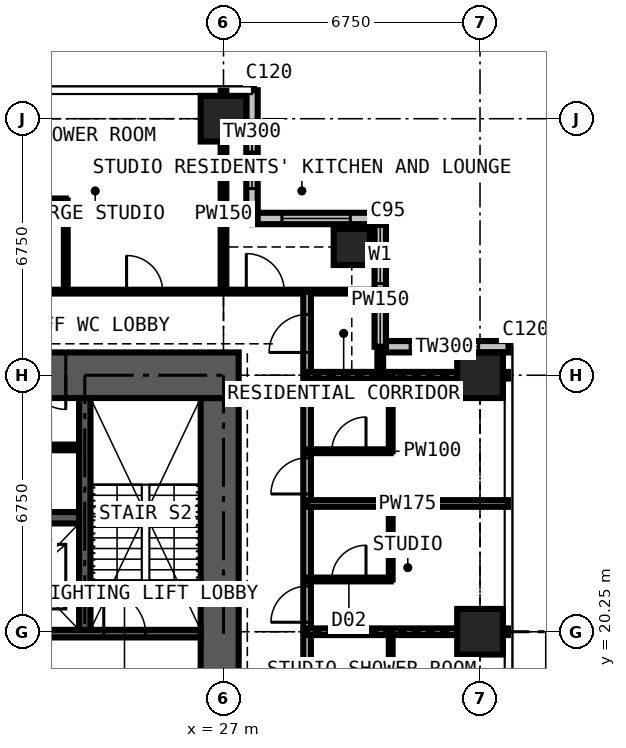
"""IFC4 building model, lengths in metres.
Left out: names, types, materials, properties, quantities, classifications, styles, units other than length and angle.
Written with IfcOpenShell. Run it as: python <this file> out.ifc"""

import sys

from ifc_helpers import new_model, si_unit, direction, frame, frame_2d, origin, origin_2d, place, context, subcontext, project, spatial, rectangle, extrude, element, fill, save


model = new_model("IFC4")
c1 = context("Model", 3, precision=1e-05, world=origin(), true_north=direction((0.0, 1.0)))
c2 = subcontext(c1, "Body", "Model", "MODEL_VIEW")
j1 = project(units=[si_unit("LENGTHUNIT", "METRE"), si_unit("PLANEANGLEUNIT", "RADIAN")], contexts=[c1])
p1 = place(None, origin())
s1 = spatial("IfcSite", under=j1, at=p1, CompositionType="ELEMENT")
p2 = place(p1, origin())
s2 = spatial("IfcBuilding", under=s1, at=p2, CompositionType="ELEMENT")
p3 = place(p2, frame((0.0, 0.0, 189.0)))
s3 = spatial("IfcBuildingStorey", under=s2, at=p3, CompositionType="ELEMENT", Elevation=189.0)
p4 = place(p3, frame((27.0, 33.75, 0.0), z_axis=(0.0, 0.0, 1.0), x_axis=(1.0, 0.0, 0.0)))
e1 = element("IfcColumn", 1, at=p4, inside=s3, PredefinedType="COLUMN", context=c2, shape_type="SweptSolid", body=[
    extrude(rectangle(XDim=1.2, YDim=1.2, at=origin_2d()), origin(), (0.0, 0.0, 1.0), 3.6),
])
p5 = place(p3, frame((30.375, 30.375, 0.0), z_axis=(0.0, 0.0, 1.0), x_axis=(1.0, 0.0, 0.0)))
e2 = element("IfcColumn", 2, at=p5, inside=s3, PredefinedType="COLUMN", context=c2, shape_type="SweptSolid", body=[
    extrude(rectangle(XDim=0.95, YDim=0.95, at=origin_2d()), origin(), (0.0, 0.0, 1.0), 3.6),
])
for number, where, z_axis, x_axis in (
    (3, (33.75, 20.25, 0.0), (0.0, 0.0, 1.0), (1.0, 0.0, 0.0)),
    (4, (33.75, 27.0, 0.0), (0.0, 0.0, 1.0), (1.0, 0.0, 0.0)),
):
    element("IfcColumn", number, at=place(p3, frame(where, z_axis=z_axis, x_axis=x_axis)), inside=s3, PredefinedType="COLUMN", context=c2, shape_type="SweptSolid", body=[
        extrude(rectangle(XDim=1.2, YDim=1.2, at=origin_2d()), origin(), (0.0, 0.0, 1.0), 3.6),
    ])
p6 = place(p3, frame((26.9, 14.1, 0.0), z_axis=(0.0, 0.0, 1.0), x_axis=(0.0, 1.0, 0.0)))
e5 = element("IfcWall", 5, at=p6, inside=s3, PredefinedType="SHEAR", context=c2, shape_type="SweptSolid", body=[
    extrude(rectangle(XDim=12.3, YDim=1.0, at=frame_2d((6.15, 0.0))), origin(), (0.0, 0.0, 1.0), 3.6),
])
p7 = place(p6, frame((3.65, 0.0, 0.0)))
e6 = element("IfcOpeningElement", 6, at=p7, cuts=e5, PredefinedType="OPENING", context=c2, shape_type="SweptSolid", body=[
    extrude(rectangle(XDim=1.2, YDim=2.2, at=frame_2d((0.6, 1.1))), frame((0.0, 0.51, 0.0), z_axis=(0.0, -1.0, 0.0), x_axis=(1.0, 0.0, 0.0)), (0.0, 0.0, 1.0), 1.02),
])
p8 = place(p3, frame((27.4, 27.0, 0.0), z_axis=(0.0, 0.0, 1.0), x_axis=(-1.0, 0.0, 0.0)))
e7 = element("IfcWall", 7, at=p8, inside=s3, PredefinedType="SHEAR", context=c2, shape_type="SweptSolid", body=[
    extrude(rectangle(XDim=14.3, YDim=1.2, at=frame_2d((7.15, 0.0))), origin(), (0.0, 0.0, 1.0), 3.6),
])
p9 = place(p8, frame((4.55, 0.0, 0.0)))
e8 = element("IfcOpeningElement", 8, at=p9, cuts=e7, PredefinedType="OPENING", context=c2, shape_type="SweptSolid", body=[
    extrude(rectangle(XDim=0.9, YDim=2.2, at=frame_2d((0.45, 1.1))), frame((0.0, 0.61, 0.0), z_axis=(0.0, -1.0, 0.0), x_axis=(1.0, 0.0, 0.0)), (0.0, 0.0, 1.0), 1.22),
])
p10 = place(p8, frame((7.525, 0.0, 0.0)))
e9 = element("IfcOpeningElement", 9, at=p10, cuts=e7, PredefinedType="OPENING", context=c2, shape_type="SweptSolid", body=[
    extrude(rectangle(XDim=1.0, YDim=2.2, at=frame_2d((0.5, 1.1))), frame((0.0, 0.61, 0.0), z_axis=(0.0, -1.0, 0.0), x_axis=(1.0, 0.0, 0.0)), (0.0, 0.0, 1.0), 1.22),
])
p11 = place(p3, frame((34.5, 27.75, 0.0), z_axis=(0.0, 0.0, 1.0), x_axis=(-1.0, 0.0, 0.0)))
e10 = element("IfcWall", 10, at=p11, inside=s3, PredefinedType="SOLIDWALL", context=c2, shape_type="SweptSolid", body=[
    extrude(rectangle(XDim=3.375, YDim=0.3, at=frame_2d((1.688, 0.0))), origin(), (0.0, 0.0, 1.0), 3.375),
])
p12 = place(p11, frame((0.788, 0.0, 0.6)))
e11 = element("IfcOpeningElement", 11, at=p12, cuts=e10, PredefinedType="OPENING", context=c2, shape_type="SweptSolid", body=[
    extrude(rectangle(XDim=1.8, YDim=2.1, at=frame_2d((0.9, 1.05))), frame((0.0, 0.16, 0.0), z_axis=(0.0, -1.0, 0.0), x_axis=(1.0, 0.0, 0.0)), (0.0, 0.0, 1.0), 0.32),
])
p13 = place(p3, frame((31.125, 27.75, 0.0), z_axis=(0.0, 0.0, 1.0), x_axis=(0.0, 1.0, 0.0)))
e12 = element("IfcWall", 12, at=p13, inside=s3, PredefinedType="SOLIDWALL", context=c2, shape_type="SweptSolid", body=[
    extrude(rectangle(XDim=3.375, YDim=0.3, at=frame_2d((1.688, 0.0))), origin(), (0.0, 0.0, 1.0), 3.375),
])
p14 = place(p13, frame((1.663, 0.0, 0.9)))
e13 = element("IfcOpeningElement", 13, at=p14, cuts=e12, PredefinedType="OPENING", context=c2, shape_type="SweptSolid", body=[
    extrude(rectangle(XDim=1.5, YDim=1.8, at=frame_2d((0.75, 0.9))), frame((0.0, 0.16, 0.0), z_axis=(0.0, -1.0, 0.0), x_axis=(1.0, 0.0, 0.0)), (0.0, 0.0, 1.0), 0.32),
])
p15 = place(p3, frame((31.125, 31.125, 0.0), z_axis=(0.0, 0.0, 1.0), x_axis=(-1.0, 0.0, 0.0)))
e14 = element("IfcWall", 14, at=p15, inside=s3, PredefinedType="SOLIDWALL", context=c2, shape_type="SweptSolid", body=[
    extrude(rectangle(XDim=3.375, YDim=0.3, at=frame_2d((1.688, 0.0))), origin(), (0.0, 0.0, 1.0), 3.375),
])
p16 = place(p15, frame((0.788, 0.0, 0.6)))
e15 = element("IfcOpeningElement", 15, at=p16, cuts=e14, PredefinedType="OPENING", context=c2, shape_type="SweptSolid", body=[
    extrude(rectangle(XDim=1.8, YDim=2.1, at=frame_2d((0.9, 1.05))), frame((0.0, 0.16, 0.0), z_axis=(0.0, -1.0, 0.0), x_axis=(1.0, 0.0, 0.0)), (0.0, 0.0, 1.0), 0.32),
])
p17 = place(p3, frame((27.75, 31.125, 0.0), z_axis=(0.0, 0.0, 1.0), x_axis=(0.0, 1.0, 0.0)))
e16 = element("IfcWall", 16, at=p17, inside=s3, PredefinedType="SOLIDWALL", context=c2, shape_type="SweptSolid", body=[
    extrude(rectangle(XDim=3.375, YDim=0.3, at=frame_2d((1.688, 0.0))), origin(), (0.0, 0.0, 1.0), 3.375),
])
p18 = place(p17, frame((0.788, 0.0, 0.6)))
e17 = element("IfcOpeningElement", 17, at=p18, cuts=e16, PredefinedType="OPENING", context=c2, shape_type="SweptSolid", body=[
    extrude(rectangle(XDim=1.8, YDim=2.1, at=frame_2d((0.9, 1.05))), frame((0.0, 0.16, 0.0), z_axis=(0.0, -1.0, 0.0), x_axis=(1.0, 0.0, 0.0)), (0.0, 0.0, 1.0), 0.32),
])
p19 = place(p3, frame((14.1, 20.2, 0.0), z_axis=(0.0, 0.0, 1.0), x_axis=(1.0, 0.0, 0.0)))
e18 = element("IfcWall", 18, at=p19, inside=s3, PredefinedType="SHEAR", context=c2, shape_type="SweptSolid", body=[
    extrude(rectangle(XDim=12.3, YDim=0.2, at=frame_2d((6.15, 0.0))), origin(), (0.0, 0.0, 1.0), 3.6),
])
p20 = place(p19, frame((4.56, 0.0, 0.0)))
e19 = element("IfcOpeningElement", 19, at=p20, cuts=e18, PredefinedType="OPENING", context=c2, shape_type="SweptSolid", body=[
    extrude(rectangle(XDim=1.1, YDim=2.2, at=frame_2d((0.55, 1.1))), frame((0.0, 0.11, 0.0), z_axis=(0.0, -1.0, 0.0), x_axis=(1.0, 0.0, 0.0)), (0.0, 0.0, 1.0), 0.22),
])
p21 = place(p19, frame((6.7, 0.0, 0.0)))
e20 = element("IfcOpeningElement", 20, at=p21, cuts=e18, PredefinedType="OPENING", context=c2, shape_type="SweptSolid", body=[
    extrude(rectangle(XDim=1.1, YDim=2.2, at=frame_2d((0.55, 1.1))), frame((0.0, 0.11, 0.0), z_axis=(0.0, -1.0, 0.0), x_axis=(1.0, 0.0, 0.0)), (0.0, 0.0, 1.0), 0.22),
])
p22 = place(p19, frame((0.35, 0.0, 0.0)))
e21 = element("IfcOpeningElement", 21, at=p22, cuts=e18, PredefinedType="OPENING", context=c2, shape_type="SweptSolid", body=[
    extrude(rectangle(XDim=1.1, YDim=2.2, at=frame_2d((0.55, 1.1))), frame((0.0, 0.11, 0.0), z_axis=(0.0, -1.0, 0.0), x_axis=(1.0, 0.0, 0.0)), (0.0, 0.0, 1.0), 0.22),
])
p23 = place(p19, frame((9.75, 0.0, 0.0)))
e22 = element("IfcOpeningElement", 22, at=p23, cuts=e18, PredefinedType="OPENING", context=c2, shape_type="SweptSolid", body=[
    extrude(rectangle(XDim=1.1, YDim=2.2, at=frame_2d((0.55, 1.1))), frame((0.0, 0.11, 0.0), z_axis=(0.0, -1.0, 0.0), x_axis=(1.0, 0.0, 0.0)), (0.0, 0.0, 1.0), 0.22),
])
p24 = place(p3, frame((23.35, 20.3, 0.0), z_axis=(0.0, 0.0, 1.0), x_axis=(0.0, 1.0, 0.0)))
e23 = element("IfcWall", 23, at=p24, inside=s3, PredefinedType="SHEAR", context=c2, shape_type="SweptSolid", body=[
    extrude(rectangle(XDim=6.1, YDim=0.3, at=frame_2d((3.05, 0.0))), origin(), (0.0, 0.0, 1.0), 3.6),
])
p25 = place(p3, frame((17.3, 23.25, 0.0), z_axis=(0.0, 0.0, 1.0), x_axis=(1.0, 0.0, 0.0)))
e24 = element("IfcWall", 24, at=p25, inside=s3, PredefinedType="SHEAR", context=c2, shape_type="SweptSolid", body=[
    extrude(rectangle(XDim=5.9, YDim=0.3, at=frame_2d((2.95, 0.0))), origin(), (0.0, 0.0, 1.0), 3.6),
])
p26 = place(p3, frame((20.8, 25.1, 0.0), z_axis=(0.0, 0.0, 1.0), x_axis=(1.0, 0.0, 0.0)))
e25 = element("IfcWall", 25, at=p26, inside=s3, PredefinedType="PARTITIONING", context=c2, shape_type="SweptSolid", body=[
    extrude(rectangle(XDim=2.4, YDim=0.15, at=frame_2d((1.2, 0.0))), origin(), (0.0, 0.0, 1.0), 3.375),
])
p27 = place(p26, frame((0.75, 0.0, 0.0)))
e26 = element("IfcOpeningElement", 26, at=p27, cuts=e25, PredefinedType="OPENING", context=c2, shape_type="SweptSolid", body=[
    extrude(rectangle(XDim=0.9, YDim=2.2, at=frame_2d((0.45, 1.1))), frame((0.0, 0.085, 0.0), z_axis=(0.0, -1.0, 0.0), x_axis=(1.0, 0.0, 0.0)), (0.0, 0.0, 1.0), 0.17),
])
p28 = place(p3, frame((11.3, 29.2, 0.0), z_axis=(0.0, 0.0, 1.0), x_axis=(1.0, 0.0, 0.0)))
e27 = element("IfcWall", 27, at=p28, inside=s3, PredefinedType="PARTITIONING", context=c2, shape_type="SweptSolid", body=[
    extrude(rectangle(XDim=19.809, YDim=0.1, at=frame_2d((9.904, 0.0))), origin(), (0.0, 0.0, 1.0), 3.375),
])
p29 = place(p28, frame((16.3, 0.0, 0.0)))
e28 = element("IfcOpeningElement", 28, at=p29, cuts=e27, PredefinedType="OPENING", context=c2, shape_type="SweptSolid", body=[
    extrude(rectangle(XDim=1.0, YDim=2.2, at=frame_2d((0.5, 1.1))), frame((0.0, 0.06, 0.0), z_axis=(0.0, -1.0, 0.0), x_axis=(1.0, 0.0, 0.0)), (0.0, 0.0, 1.0), 0.12),
])
p30 = place(p28, frame((6.4, 0.0, 0.0)))
e29 = element("IfcOpeningElement", 29, at=p30, cuts=e27, PredefinedType="OPENING", context=c2, shape_type="SweptSolid", body=[
    extrude(rectangle(XDim=0.95, YDim=2.2, at=frame_2d((0.475, 1.1))), frame((0.0, 0.06, 0.0), z_axis=(0.0, -1.0, 0.0), x_axis=(1.0, 0.0, 0.0)), (0.0, 0.0, 1.0), 0.12),
])
p31 = place(p28, frame((13.15, 0.0, 0.0)))
e30 = element("IfcOpeningElement", 30, at=p31, cuts=e27, PredefinedType="OPENING", context=c2, shape_type="SweptSolid", body=[
    extrude(rectangle(XDim=0.95, YDim=2.2, at=frame_2d((0.475, 1.1))), frame((0.0, 0.06, 0.0), z_axis=(0.0, -1.0, 0.0), x_axis=(1.0, 0.0, 0.0)), (0.0, 0.0, 1.0), 0.12),
])
p32 = place(p28, frame((0.6, 0.0, 0.0)))
e31 = element("IfcOpeningElement", 31, at=p32, cuts=e27, PredefinedType="OPENING", context=c2, shape_type="SweptSolid", body=[
    extrude(rectangle(XDim=1.0, YDim=2.2, at=frame_2d((0.5, 1.1))), frame((0.0, 0.06, 0.0), z_axis=(0.0, -1.0, 0.0), x_axis=(1.0, 0.0, 0.0)), (0.0, 0.0, 1.0), 0.12),
])
p33 = place(p3, frame((20.25, 31.6, 0.0), z_axis=(0.0, 0.0, 1.0), x_axis=(1.0, 0.0, 0.0)))
e32 = element("IfcWall", 32, at=p33, inside=s3, PredefinedType="PARTITIONING", context=c2, shape_type="SweptSolid", body=[
    extrude(rectangle(XDim=2.6, YDim=0.1, at=frame_2d((1.3, 0.0))), origin(), (0.0, 0.0, 1.0), 3.375),
])
p34 = place(p3, frame((22.85, 29.2, 0.0), z_axis=(0.0, 0.0, 1.0), x_axis=(0.0, 1.0, 0.0)))
e33 = element("IfcWall", 33, at=p34, inside=s3, PredefinedType="PARTITIONING", context=c2, shape_type="SweptSolid", body=[
    extrude(rectangle(XDim=2.4, YDim=0.1, at=frame_2d((1.2, 0.0))), origin(), (0.0, 0.0, 1.0), 3.375),
])
p35 = place(p3, frame((27.0, 29.2, 0.0), z_axis=(0.0, 0.0, 1.0), x_axis=(0.0, 1.0, 0.0)))
e34 = element("IfcWall", 34, at=p35, inside=s3, PredefinedType="PARTITIONING", context=c2, shape_type="SweptSolid", body=[
    extrude(rectangle(XDim=5.284, YDim=0.15, at=frame_2d((2.642, 0.0))), origin(), (0.0, 0.0, 1.0), 2.806),
])
p36 = place(p3, frame((29.2, 13.5, 0.0), z_axis=(0.0, 0.0, 1.0), x_axis=(0.0, 1.0, 0.0)))
e35 = element("IfcWall", 35, at=p36, inside=s3, PredefinedType="PARTITIONING", context=c2, shape_type="SweptSolid", body=[
    extrude(rectangle(XDim=15.7, YDim=0.2, at=frame_2d((7.85, 0.0))), origin(), (0.0, 0.0, 1.0), 3.375),
])
p37 = place(p36, frame((3.625, 0.0, 0.0)))
e36 = element("IfcOpeningElement", 36, at=p37, cuts=e35, PredefinedType="OPENING", context=c2, shape_type="SweptSolid", body=[
    extrude(rectangle(XDim=0.95, YDim=2.2, at=frame_2d((0.475, 1.1))), frame((0.0, 0.11, 0.0), z_axis=(0.0, -1.0, 0.0), x_axis=(1.0, 0.0, 0.0)), (0.0, 0.0, 1.0), 0.22),
])
p38 = place(p36, frame((7.0, 0.0, 0.0)))
e37 = element("IfcOpeningElement", 37, at=p38, cuts=e35, PredefinedType="OPENING", context=c2, shape_type="SweptSolid", body=[
    extrude(rectangle(XDim=0.95, YDim=2.2, at=frame_2d((0.475, 1.1))), frame((0.0, 0.11, 0.0), z_axis=(0.0, -1.0, 0.0), x_axis=(1.0, 0.0, 0.0)), (0.0, 0.0, 1.0), 0.22),
])
p39 = place(p36, frame((10.375, 0.0, 0.0)))
e38 = element("IfcOpeningElement", 38, at=p39, cuts=e35, PredefinedType="OPENING", context=c2, shape_type="SweptSolid", body=[
    extrude(rectangle(XDim=0.95, YDim=2.2, at=frame_2d((0.475, 1.1))), frame((0.0, 0.11, 0.0), z_axis=(0.0, -1.0, 0.0), x_axis=(1.0, 0.0, 0.0)), (0.0, 0.0, 1.0), 0.22),
])
p40 = place(p36, frame((14.1, 0.0, 0.0)))
e39 = element("IfcOpeningElement", 39, at=p40, cuts=e35, PredefinedType="OPENING", context=c2, shape_type="SweptSolid", body=[
    extrude(rectangle(XDim=1.0, YDim=2.2, at=frame_2d((0.5, 1.1))), frame((0.0, 0.11, 0.0), z_axis=(0.0, -1.0, 0.0), x_axis=(1.0, 0.0, 0.0)), (0.0, 0.0, 1.0), 0.22),
])
p41 = place(p3, frame((29.2, 20.25, 0.0), z_axis=(0.0, 0.0, 1.0), x_axis=(1.0, 0.0, 0.0)))
e40 = element("IfcWall", 40, at=p41, inside=s3, PredefinedType="PARTITIONING", context=c2, shape_type="SweptSolid", body=[
    extrude(rectangle(XDim=5.284, YDim=0.175, at=frame_2d((2.642, 0.0))), origin(), (0.0, 0.0, 1.0), 2.61),
])
p42 = place(p3, frame((29.2, 21.625, 0.0), z_axis=(0.0, 0.0, 1.0), x_axis=(1.0, 0.0, 0.0)))
e41 = element("IfcWall", 41, at=p42, inside=s3, PredefinedType="PARTITIONING", context=c2, shape_type="SweptSolid", body=[
    extrude(rectangle(XDim=2.2, YDim=0.1, at=frame_2d((1.1, 0.0))), origin(), (0.0, 0.0, 1.0), 3.375),
])
p43 = place(p42, frame((0.65, 0.0, 0.0)))
e42 = element("IfcOpeningElement", 42, at=p43, cuts=e41, PredefinedType="OPENING", context=c2, shape_type="SweptSolid", body=[
    extrude(rectangle(XDim=0.9, YDim=2.2, at=frame_2d((0.45, 1.1))), frame((0.0, 0.06, 0.0), z_axis=(0.0, -1.0, 0.0), x_axis=(1.0, 0.0, 0.0)), (0.0, 0.0, 1.0), 0.12),
])
p44 = place(p3, frame((29.2, 23.625, 0.0), z_axis=(0.0, 0.0, 1.0), x_axis=(1.0, 0.0, 0.0)))
e43 = element("IfcWall", 43, at=p44, inside=s3, PredefinedType="PARTITIONING", context=c2, shape_type="SweptSolid", body=[
    extrude(rectangle(XDim=5.284, YDim=0.175, at=frame_2d((2.642, 0.0))), origin(), (0.0, 0.0, 1.0), 3.375),
])
p45 = place(p3, frame((29.2, 25.0, 0.0), z_axis=(0.0, 0.0, 1.0), x_axis=(1.0, 0.0, 0.0)))
e44 = element("IfcWall", 44, at=p45, inside=s3, PredefinedType="PARTITIONING", context=c2, shape_type="SweptSolid", body=[
    extrude(rectangle(XDim=2.2, YDim=0.1, at=frame_2d((1.1, 0.0))), origin(), (0.0, 0.0, 1.0), 3.375),
])
p46 = place(p45, frame((0.65, 0.0, 0.0)))
e45 = element("IfcOpeningElement", 45, at=p46, cuts=e44, PredefinedType="OPENING", context=c2, shape_type="SweptSolid", body=[
    extrude(rectangle(XDim=0.9, YDim=2.2, at=frame_2d((0.45, 1.1))), frame((0.0, 0.06, 0.0), z_axis=(0.0, -1.0, 0.0), x_axis=(1.0, 0.0, 0.0)), (0.0, 0.0, 1.0), 0.12),
])
p47 = place(p3, frame((29.2, 27.0, 0.0), z_axis=(0.0, 0.0, 1.0), x_axis=(1.0, 0.0, 0.0)))
e46 = element("IfcWall", 46, at=p47, inside=s3, PredefinedType="PARTITIONING", context=c2, shape_type="SweptSolid", body=[
    extrude(rectangle(XDim=5.284, YDim=0.175, at=frame_2d((2.642, 0.0))), origin(), (0.0, 0.0, 1.0), 2.806),
])
p48 = place(p3, frame((31.125, 27.0, 0.0), z_axis=(0.0, 0.0, 1.0), x_axis=(0.0, 1.0, 0.0)))
e47 = element("IfcWall", 47, at=p48, inside=s3, PredefinedType="PARTITIONING", context=c2, shape_type="SweptSolid", body=[
    extrude(rectangle(XDim=0.734, YDim=0.15, at=frame_2d((0.367, 0.0))), origin(), (0.0, 0.0, 1.0), 3.375),
])
for number, where, z_axis, x_axis in (
    (48, (31.4, 18.25, 0.0), (0.0, 0.0, 1.0), (0.0, 1.0, 0.0)),
    (49, (31.4, 21.625, 0.0), (0.0, 0.0, 1.0), (0.0, 1.0, 0.0)),
    (50, (31.4, 25.0, 0.0), (0.0, 0.0, 1.0), (0.0, 1.0, 0.0)),
):
    element("IfcWall", number, at=place(p3, frame(where, z_axis=z_axis, x_axis=x_axis)), inside=s3, PredefinedType="PARTITIONING", context=c2, shape_type="SweptSolid", body=[
        extrude(rectangle(XDim=2.0, YDim=0.1, at=frame_2d((1.0, 0.0))), origin(), (0.0, 0.0, 1.0), 3.375),
    ])
p49 = place(p12, origin())
e51 = element("IfcWindow", 51, at=p49, inside=s3, PartitioningType="SINGLE_PANEL", PredefinedType="WINDOW", context=c2, shape_type="SweptSolid", body=[
    extrude(rectangle(XDim=1.8, YDim=2.1, at=frame_2d((0.9, 1.05))), frame((0.0, 0.03, 0.0), z_axis=(0.0, -1.0, 0.0), x_axis=(1.0, 0.0, 0.0)), (0.0, 0.0, 1.0), 0.06),
])
fill(e11, e51)
p50 = place(p14, origin())
e52 = element("IfcWindow", 52, at=p50, inside=s3, PartitioningType="SINGLE_PANEL", PredefinedType="WINDOW", context=c2, shape_type="SweptSolid", body=[
    extrude(rectangle(XDim=1.5, YDim=1.8, at=frame_2d((0.75, 0.9))), frame((0.0, 0.03, 0.0), z_axis=(0.0, -1.0, 0.0), x_axis=(1.0, 0.0, 0.0)), (0.0, 0.0, 1.0), 0.06),
])
fill(e13, e52)
p51 = place(p16, origin())
e53 = element("IfcWindow", 53, at=p51, inside=s3, PartitioningType="SINGLE_PANEL", PredefinedType="WINDOW", context=c2, shape_type="SweptSolid", body=[
    extrude(rectangle(XDim=1.8, YDim=2.1, at=frame_2d((0.9, 1.05))), frame((0.0, 0.03, 0.0), z_axis=(0.0, -1.0, 0.0), x_axis=(1.0, 0.0, 0.0)), (0.0, 0.0, 1.0), 0.06),
])
fill(e15, e53)
p52 = place(p18, origin())
e54 = element("IfcWindow", 54, at=p52, inside=s3, PartitioningType="SINGLE_PANEL", PredefinedType="WINDOW", context=c2, shape_type="SweptSolid", body=[
    extrude(rectangle(XDim=1.8, YDim=2.1, at=frame_2d((0.9, 1.05))), frame((0.0, 0.03, 0.0), z_axis=(0.0, -1.0, 0.0), x_axis=(1.0, 0.0, 0.0)), (0.0, 0.0, 1.0), 0.06),
])
fill(e17, e54)
p53 = place(p9, origin())
e55 = element("IfcDoor", 55, at=p53, inside=s3, OperationType="SINGLE_SWING_LEFT", PredefinedType="DOOR", context=c2, shape_type="SweptSolid", body=[
    extrude(rectangle(XDim=0.9, YDim=2.2, at=frame_2d((0.45, 1.1))), frame((0.0, 0.4, 0.0), z_axis=(0.0, -1.0, 0.0), x_axis=(1.0, 0.0, 0.0)), (0.0, 0.0, 1.0), 0.8),
])
fill(e8, e55)
p54 = place(p23, origin())
e56 = element("IfcDoor", 56, at=p54, inside=s3, OperationType="SINGLE_SWING_LEFT", PredefinedType="DOOR", context=c2, shape_type="SweptSolid", body=[
    extrude(rectangle(XDim=1.1, YDim=2.2, at=frame_2d((0.55, 1.1))), frame((0.0, 0.025, 0.0), z_axis=(0.0, -1.0, 0.0), x_axis=(1.0, 0.0, 0.0)), (0.0, 0.0, 1.0), 0.05),
])
fill(e22, e56)
p55 = place(p38, origin())
e57 = element("IfcDoor", 57, at=p55, inside=s3, OperationType="SINGLE_SWING_LEFT", PredefinedType="DOOR", context=c2, shape_type="SweptSolid", body=[
    extrude(rectangle(XDim=0.95, YDim=2.2, at=frame_2d((0.475, 1.1))), frame((0.0, 0.025, 0.0), z_axis=(0.0, -1.0, 0.0), x_axis=(1.0, 0.0, 0.0)), (0.0, 0.0, 1.0), 0.05),
])
fill(e37, e57)
p56 = place(p43, origin())
e58 = element("IfcDoor", 58, at=p56, inside=s3, OperationType="SINGLE_SWING_RIGHT", PredefinedType="DOOR", context=c2, shape_type="SweptSolid", body=[
    extrude(rectangle(XDim=0.9, YDim=2.2, at=frame_2d((0.45, 1.1))), frame((0.0, 0.025, 0.0), z_axis=(0.0, -1.0, 0.0), x_axis=(1.0, 0.0, 0.0)), (0.0, 0.0, 1.0), 0.05),
])
fill(e42, e58)
p57 = place(p39, origin())
e59 = element("IfcDoor", 59, at=p57, inside=s3, OperationType="SINGLE_SWING_LEFT", PredefinedType="DOOR", context=c2, shape_type="SweptSolid", body=[
    extrude(rectangle(XDim=0.95, YDim=2.2, at=frame_2d((0.475, 1.1))), frame((0.0, 0.025, 0.0), z_axis=(0.0, -1.0, 0.0), x_axis=(1.0, 0.0, 0.0)), (0.0, 0.0, 1.0), 0.05),
])
fill(e38, e59)
p58 = place(p46, origin())
e60 = element("IfcDoor", 60, at=p58, inside=s3, OperationType="SINGLE_SWING_RIGHT", PredefinedType="DOOR", context=c2, shape_type="SweptSolid", body=[
    extrude(rectangle(XDim=0.9, YDim=2.2, at=frame_2d((0.45, 1.1))), frame((0.0, 0.025, 0.0), z_axis=(0.0, -1.0, 0.0), x_axis=(1.0, 0.0, 0.0)), (0.0, 0.0, 1.0), 0.05),
])
fill(e45, e60)
p59 = place(p40, origin())
e61 = element("IfcDoor", 61, at=p59, inside=s3, OperationType="SINGLE_SWING_LEFT", PredefinedType="DOOR", context=c2, shape_type="SweptSolid", body=[
    extrude(rectangle(XDim=1.0, YDim=2.2, at=frame_2d((0.5, 1.1))), frame((0.0, 0.025, 0.0), z_axis=(0.0, -1.0, 0.0), x_axis=(1.0, 0.0, 0.0)), (0.0, 0.0, 1.0), 0.05),
])
fill(e39, e61)
p60 = place(p29, origin())
e62 = element("IfcDoor", 62, at=p60, inside=s3, OperationType="SINGLE_SWING_LEFT", PredefinedType="DOOR", context=c2, shape_type="SweptSolid", body=[
    extrude(rectangle(XDim=1.0, YDim=2.2, at=frame_2d((0.5, 1.1))), frame((0.0, 0.025, 0.0), z_axis=(0.0, -1.0, 0.0), x_axis=(1.0, 0.0, 0.0)), (0.0, 0.0, 1.0), 0.05),
])
fill(e28, e62)
p61 = place(p31, origin())
e63 = element("IfcDoor", 63, at=p61, inside=s3, OperationType="SINGLE_SWING_LEFT", PredefinedType="DOOR", context=c2, shape_type="SweptSolid", body=[
    extrude(rectangle(XDim=0.95, YDim=2.2, at=frame_2d((0.475, 1.1))), frame((0.0, 0.025, 0.0), z_axis=(0.0, -1.0, 0.0), x_axis=(1.0, 0.0, 0.0)), (0.0, 0.0, 1.0), 0.05),
])
fill(e30, e63)
save(model, sys.argv[1])
